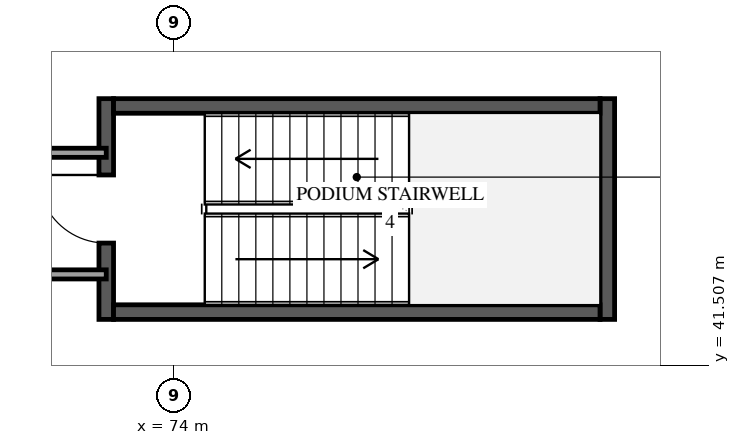
"""IFC4 building model, lengths in metres.
Left out: names, types, materials, properties, quantities, classifications, styles, units other than length and angle.
Written with IfcOpenShell. Run it as: python <this file> out.ifc"""

import sys

from ifc_helpers import new_model, si_unit, direction, frame, frame_2d, origin, place, context, subcontext, project, spatial, rectangle, extrude, element, fill, save


model = new_model("IFC4")
c1 = context("Model", 3, precision=1e-05, world=origin(), true_north=direction((0.0, 1.0)))
c2 = subcontext(c1, "Body", "Model", "MODEL_VIEW")
j1 = project(units=[si_unit("LENGTHUNIT", "METRE"), si_unit("PLANEANGLEUNIT", "RADIAN")], contexts=[c1])
p1 = place(None, origin())
s1 = spatial("IfcSite", under=j1, at=p1, CompositionType="ELEMENT")
p2 = place(p1, origin())
s2 = spatial("IfcBuilding", under=s1, at=p2, CompositionType="ELEMENT")
p3 = place(p2, frame((0.0, 0.0, 20.7)))
s3 = spatial("IfcBuildingStorey", under=s2, at=p3, CompositionType="ELEMENT", Elevation=20.7)
p4 = place(p3, frame((72.88, 42.26, 0.0), z_axis=(0.0, 0.0, 1.0), x_axis=(0.0, 1.0, 0.0)))
e1 = element("IfcWall", 1, at=p4, inside=s3, PredefinedType="SHEAR", context=c2, shape_type="SweptSolid", body=[
    extrude(rectangle(XDim=3.63, YDim=0.24, at=frame_2d((1.815, 0.0))), origin(), (0.0, 0.0, 1.0), 4.5),
])
p5 = place(p4, frame((1.255, 0.0, 0.0)))
e2 = element("IfcOpeningElement", 2, at=p5, cuts=e1, PredefinedType="OPENING", context=c2, shape_type="SweptSolid", body=[
    extrude(rectangle(XDim=1.12, YDim=2.15, at=frame_2d((0.56, 1.075))), frame((0.0, 0.13, 0.0), z_axis=(0.0, -1.0, 0.0), x_axis=(1.0, 0.0, 0.0)), (0.0, 0.0, 1.0), 0.26),
])
p6 = place(p3, frame((81.12, 42.26, 0.0), z_axis=(0.0, 0.0, 1.0), x_axis=(0.0, 1.0, 0.0)))
e3 = element("IfcWall", 3, at=p6, inside=s3, PredefinedType="SHEAR", context=c2, shape_type="SweptSolid", body=[
    extrude(rectangle(XDim=3.63, YDim=0.24, at=frame_2d((1.815, 0.0))), origin(), (0.0, 0.0, 1.0), 4.5),
])
for number, where, z_axis, x_axis in (
    (4, (73.0, 42.38, 0.0), (0.0, 0.0, 1.0), (1.0, 0.0, 0.0)),
    (5, (73.0, 45.77, 0.0), (0.0, 0.0, 1.0), (1.0, 0.0, 0.0)),
):
    element("IfcWall", number, at=place(p3, frame(where, z_axis=z_axis, x_axis=x_axis)), inside=s3, PredefinedType="SHEAR", context=c2, shape_type="SweptSolid", body=[
        extrude(rectangle(XDim=8.0, YDim=0.24, at=frame_2d((4.0, 0.0))), origin(), (0.0, 0.0, 1.0), 4.5),
    ])
p7 = place(p3, frame((44.87, 45.0, 0.0), z_axis=(0.0, 0.0, 1.0), x_axis=(1.0, 0.0, 0.0)))
e6 = element("IfcWall", 6, at=p7, inside=s3, PredefinedType="PARTITIONING", context=c2, shape_type="SweptSolid", body=[
    extrude(rectangle(XDim=28.01, YDim=0.15, at=frame_2d((14.005, 0.0))), origin(), (0.0, 0.0, 1.0), 4.18),
])
p8 = place(p7, frame((13.53, 0.0, 0.0)))
e7 = element("IfcOpeningElement", 7, at=p8, cuts=e6, PredefinedType="OPENING", context=c2, shape_type="SweptSolid", body=[
    extrude(rectangle(XDim=0.92, YDim=2.12, at=frame_2d((0.46, 1.06))), frame((0.0, 0.085, 0.0), z_axis=(0.0, -1.0, 0.0), x_axis=(1.0, 0.0, 0.0)), (0.0, 0.0, 1.0), 0.17),
])
p9 = place(p3, frame((72.88, 43.0, 0.0), z_axis=(0.0, 0.0, 1.0), x_axis=(-1.0, 0.0, 0.0)))
e8 = element("IfcWall", 8, at=p9, inside=s3, PredefinedType="PARTITIONING", context=c2, shape_type="SweptSolid", body=[
    extrude(rectangle(XDim=8.81, YDim=0.15, at=frame_2d((4.405, 0.0))), origin(), (0.0, 0.0, 1.0), 4.18),
])
p10 = place(p5, origin())
e9 = element("IfcDoor", 9, at=p10, inside=s3, OperationType="SINGLE_SWING_RIGHT", PredefinedType="DOOR", context=c2, shape_type="SweptSolid", body=[
    extrude(rectangle(XDim=1.12, YDim=2.15, at=frame_2d((0.56, 1.075))), frame((0.0, 0.025, 0.0), z_axis=(0.0, -1.0, 0.0), x_axis=(1.0, 0.0, 0.0)), (0.0, 0.0, 1.0), 0.05),
])
fill(e2, e9)
save(model, sys.argv[1])
